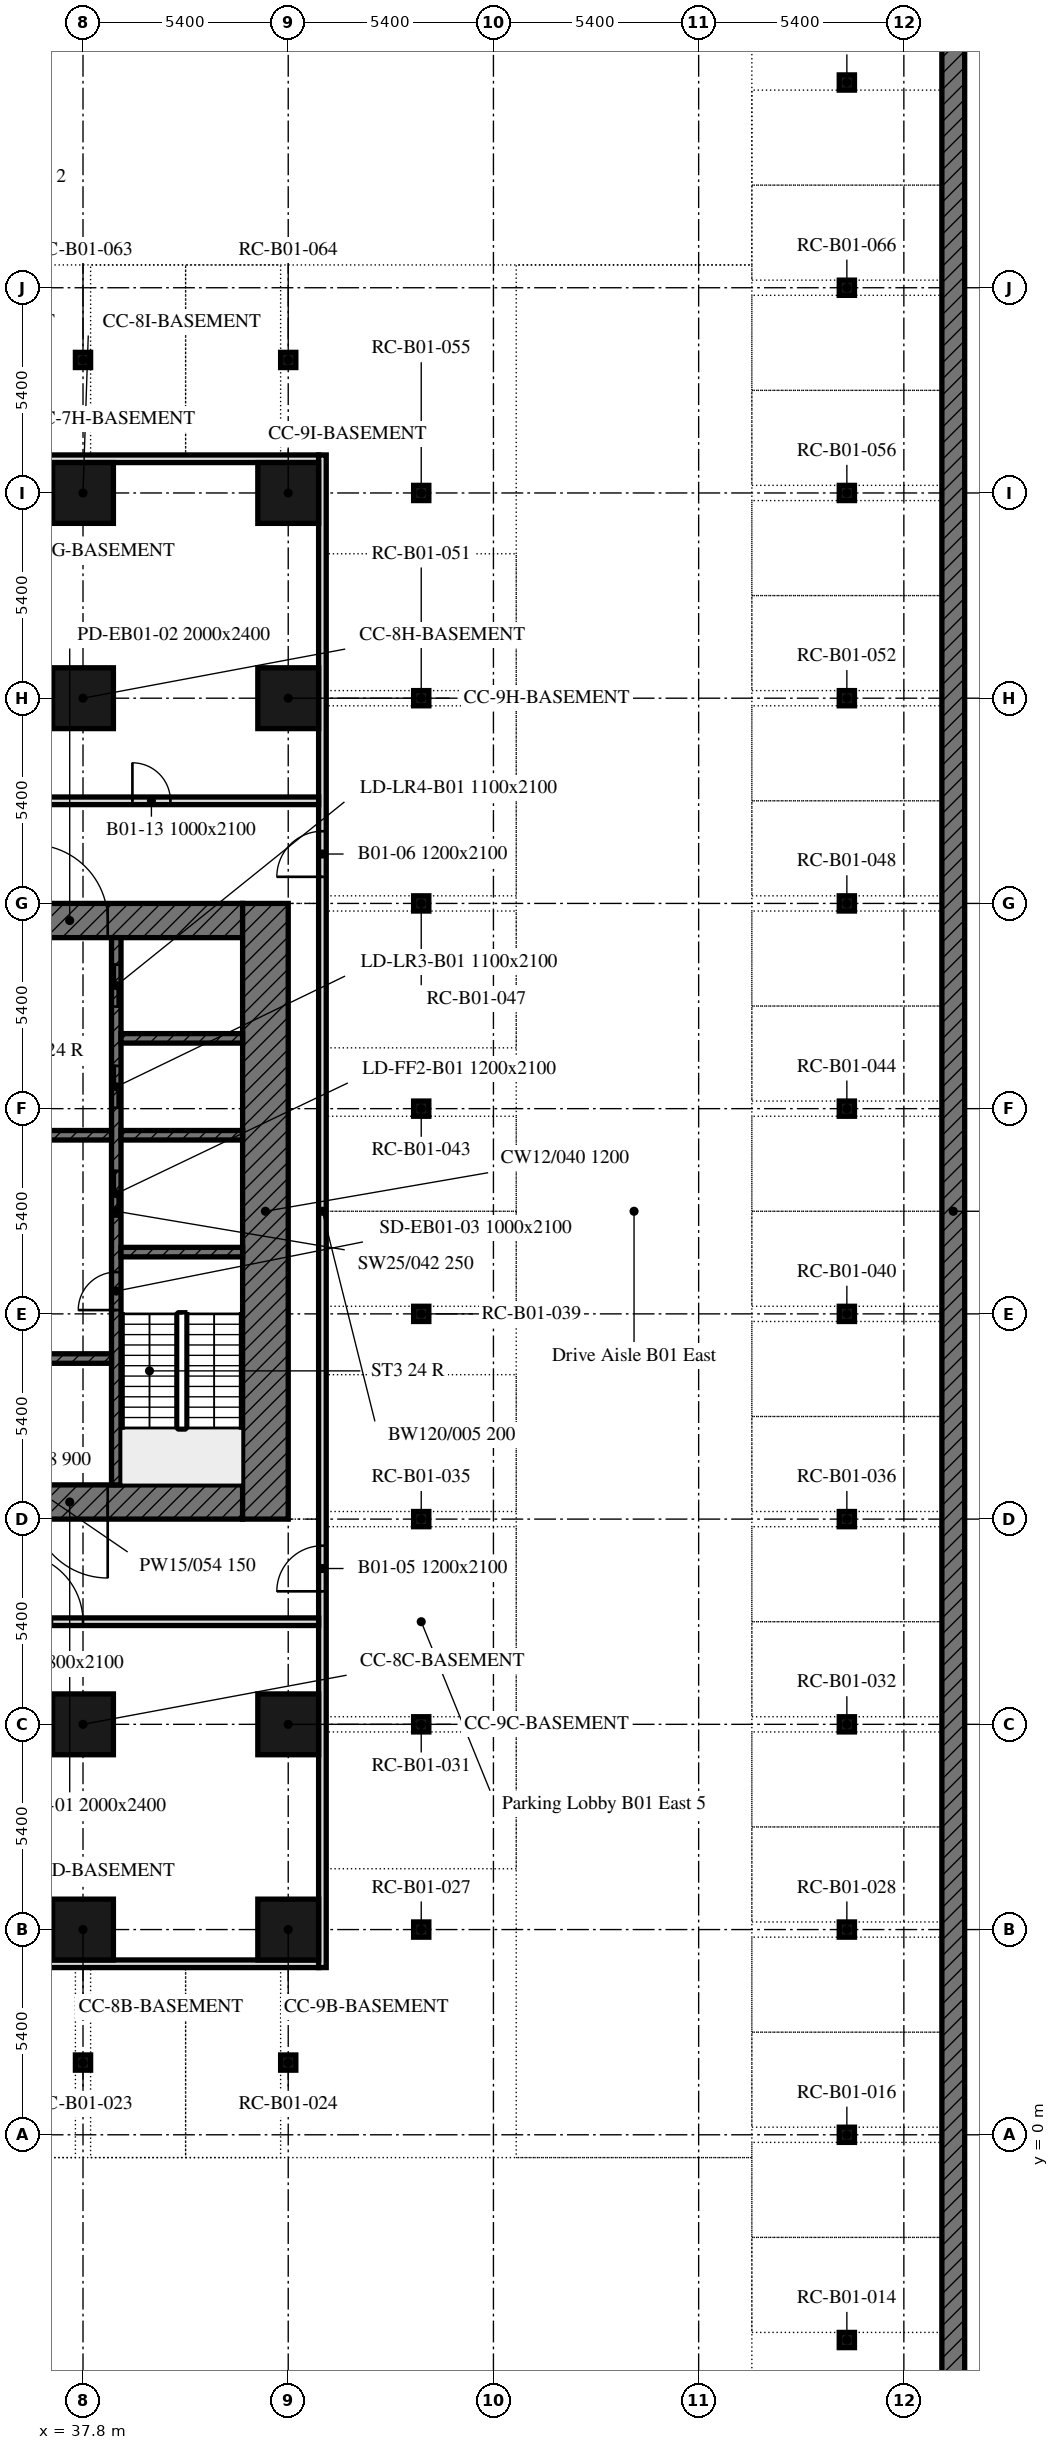
"""IFC4 building model, lengths in metres.
Left out: names, types, materials, properties, quantities, classifications, styles, units other than length and angle.
Written with IfcOpenShell. Run it as: python <this file> out.ifc"""

import sys

from ifc_helpers import new_model, si_unit, direction, frame, frame_2d, origin, origin_2d, place, context, subcontext, project, spatial, rectangle, extrude, element, fill, save


model = new_model("IFC4")
c1 = context("Model", 3, precision=1e-05, world=origin(), true_north=direction((0.0, 1.0)))
c2 = subcontext(c1, "Body", "Model", "MODEL_VIEW")
j1 = project(units=[si_unit("LENGTHUNIT", "METRE"), si_unit("PLANEANGLEUNIT", "RADIAN")], contexts=[c1])
p1 = place(None, origin())
s1 = spatial("IfcSite", under=j1, at=p1, CompositionType="ELEMENT")
p2 = place(p1, origin())
s2 = spatial("IfcBuilding", under=s1, at=p2, CompositionType="ELEMENT")
p3 = place(p2, frame((0.0, 0.0, -4.5)))
s3 = spatial("IfcBuildingStorey", under=s2, at=p3, CompositionType="ELEMENT", Elevation=-4.5)
p4 = place(p3, frame((60.7, -12.4, 0.0), z_axis=(0.0, 0.0, 1.0), x_axis=(0.0, 1.0, 0.0)))
e1 = element("IfcWall", 1, at=p4, inside=s3, PredefinedType="SOLIDWALL", context=c2, shape_type="SweptSolid", body=[
    extrude(rectangle(XDim=73.4, YDim=0.6, at=frame_2d((36.7, 0.0))), origin(), (0.0, 0.0, 1.0), 4.0),
])
for number, where, z_axis, x_axis in (
    (2, (37.8, 5.4, 0.0), (0.0, 0.0, 1.0), (1.0, 0.0, 0.0)),
    (3, (43.2, 5.4, 0.0), (0.0, 0.0, 1.0), (1.0, 0.0, 0.0)),
    (4, (37.8, 10.8, 0.0), (0.0, 0.0, 1.0), (1.0, 0.0, 0.0)),
    (5, (43.2, 10.8, 0.0), (0.0, 0.0, 1.0), (1.0, 0.0, 0.0)),
    (6, (37.8, 37.8, 0.0), (0.0, 0.0, 1.0), (1.0, 0.0, 0.0)),
    (7, (43.2, 37.8, 0.0), (0.0, 0.0, 1.0), (1.0, 0.0, 0.0)),
    (8, (37.8, 43.2, 0.0), (0.0, 0.0, 1.0), (1.0, 0.0, 0.0)),
    (9, (43.2, 43.2, 0.0), (0.0, 0.0, 1.0), (1.0, 0.0, 0.0)),
):
    element("IfcColumn", number, at=place(p3, frame(where, z_axis=z_axis, x_axis=x_axis)), inside=s3, PredefinedType="COLUMN", context=c2, shape_type="SweptSolid", body=[
        extrude(rectangle(XDim=1.6, YDim=1.6, at=origin_2d()), origin(), (0.0, 0.0, 1.0), 4.0),
    ])
for number, where, z_axis, x_axis in (
    (10, (57.9, -5.4, 0.0), (0.0, 0.0, 1.0), (1.0, 0.0, 0.0)),
    (11, (57.9, 0.0, 0.0), (0.0, 0.0, 1.0), (1.0, 0.0, 0.0)),
    (12, (37.8, 1.9, 0.0), (0.0, 0.0, 1.0), (1.0, 0.0, 0.0)),
    (13, (43.2, 1.9, 0.0), (0.0, 0.0, 1.0), (1.0, 0.0, 0.0)),
    (14, (46.7, 5.4, 0.0), (0.0, 0.0, 1.0), (1.0, 0.0, 0.0)),
    (15, (57.9, 5.4, 0.0), (0.0, 0.0, 1.0), (1.0, 0.0, 0.0)),
    (16, (46.7, 10.8, 0.0), (0.0, 0.0, 1.0), (1.0, 0.0, 0.0)),
    (17, (57.9, 10.8, 0.0), (0.0, 0.0, 1.0), (1.0, 0.0, 0.0)),
    (18, (46.7, 16.2, 0.0), (0.0, 0.0, 1.0), (1.0, 0.0, 0.0)),
    (19, (57.9, 16.2, 0.0), (0.0, 0.0, 1.0), (1.0, 0.0, 0.0)),
    (20, (46.7, 21.6, 0.0), (0.0, 0.0, 1.0), (1.0, 0.0, 0.0)),
    (21, (57.9, 21.6, 0.0), (0.0, 0.0, 1.0), (1.0, 0.0, 0.0)),
    (22, (46.7, 27.0, 0.0), (0.0, 0.0, 1.0), (1.0, 0.0, 0.0)),
    (23, (57.9, 27.0, 0.0), (0.0, 0.0, 1.0), (1.0, 0.0, 0.0)),
    (24, (46.7, 32.4, 0.0), (0.0, 0.0, 1.0), (1.0, 0.0, 0.0)),
    (25, (57.9, 32.4, 0.0), (0.0, 0.0, 1.0), (1.0, 0.0, 0.0)),
    (26, (46.7, 37.8, 0.0), (0.0, 0.0, 1.0), (1.0, 0.0, 0.0)),
    (27, (57.9, 37.8, 0.0), (0.0, 0.0, 1.0), (1.0, 0.0, 0.0)),
    (28, (46.7, 43.2, 0.0), (0.0, 0.0, 1.0), (1.0, 0.0, 0.0)),
    (29, (57.9, 43.2, 0.0), (0.0, 0.0, 1.0), (1.0, 0.0, 0.0)),
    (30, (37.8, 46.7, 0.0), (0.0, 0.0, 1.0), (1.0, 0.0, 0.0)),
    (31, (43.2, 46.7, 0.0), (0.0, 0.0, 1.0), (1.0, 0.0, 0.0)),
    (32, (57.9, 48.6, 0.0), (0.0, 0.0, 1.0), (1.0, 0.0, 0.0)),
    (33, (57.9, 54.0, 0.0), (0.0, 0.0, 1.0), (1.0, 0.0, 0.0)),
):
    element("IfcColumn", number, at=place(p3, frame(where, z_axis=z_axis, x_axis=x_axis)), inside=s3, PredefinedType="COLUMN", context=c2, shape_type="SweptSolid", body=[
        extrude(rectangle(XDim=0.4, YDim=0.4, at=origin_2d()), origin(), (0.0, 0.0, 1.0), 4.0),
    ])
p5 = place(p3, frame((4.6, 4.5, 0.0), z_axis=(0.0, 0.0, 1.0), x_axis=(1.0, 0.0, 0.0)))
e34 = element("IfcWall", 34, at=p5, inside=s3, PredefinedType="PARTITIONING", context=c2, shape_type="SweptSolid", body=[
    extrude(rectangle(XDim=39.4, YDim=0.2, at=frame_2d((19.7, 0.0))), origin(), (0.0, 0.0, 1.0), 4.0),
])
p6 = place(p5, frame((18.3, 0.0, 0.0)))
e35 = element("IfcOpeningElement", 35, at=p6, cuts=e34, PredefinedType="OPENING", context=c2, shape_type="SweptSolid", body=[
    extrude(rectangle(XDim=1.2, YDim=2.1, at=frame_2d((0.6, 1.05))), frame((0.0, 0.11, 0.0), z_axis=(0.0, -1.0, 0.0), x_axis=(1.0, 0.0, 0.0)), (0.0, 0.0, 1.0), 0.22),
])
p7 = place(p3, frame((4.6, 44.1, 0.0), z_axis=(0.0, 0.0, 1.0), x_axis=(1.0, 0.0, 0.0)))
e36 = element("IfcWall", 36, at=p7, inside=s3, PredefinedType="PARTITIONING", context=c2, shape_type="SweptSolid", body=[
    extrude(rectangle(XDim=39.4, YDim=0.2, at=frame_2d((19.7, 0.0))), origin(), (0.0, 0.0, 1.0), 4.0),
])
p8 = place(p7, frame((23.4, 0.0, 0.0)))
e37 = element("IfcOpeningElement", 37, at=p8, cuts=e36, PredefinedType="OPENING", context=c2, shape_type="SweptSolid", body=[
    extrude(rectangle(XDim=1.2, YDim=2.1, at=frame_2d((0.6, 1.05))), frame((0.0, 0.11, 0.0), z_axis=(0.0, -1.0, 0.0), x_axis=(1.0, 0.0, 0.0)), (0.0, 0.0, 1.0), 0.22),
])
p9 = place(p3, frame((44.1, 4.4, 0.0), z_axis=(0.0, 0.0, 1.0), x_axis=(0.0, 1.0, 0.0)))
e38 = element("IfcWall", 38, at=p9, inside=s3, PredefinedType="PARTITIONING", context=c2, shape_type="SweptSolid", body=[
    extrude(rectangle(XDim=39.8, YDim=0.2, at=frame_2d((19.9, 0.0))), origin(), (0.0, 0.0, 1.0), 4.0),
])
p10 = place(p9, frame((9.9, 0.0, 0.0)))
e39 = element("IfcOpeningElement", 39, at=p10, cuts=e38, PredefinedType="OPENING", context=c2, shape_type="SweptSolid", body=[
    extrude(rectangle(XDim=1.2, YDim=2.1, at=frame_2d((0.6, 1.05))), frame((0.0, 0.11, 0.0), z_axis=(0.0, -1.0, 0.0), x_axis=(1.0, 0.0, 0.0)), (0.0, 0.0, 1.0), 0.22),
])
p11 = place(p9, frame((28.7, 0.0, 0.0)))
e40 = element("IfcOpeningElement", 40, at=p11, cuts=e38, PredefinedType="OPENING", context=c2, shape_type="SweptSolid", body=[
    extrude(rectangle(XDim=1.2, YDim=2.1, at=frame_2d((0.6, 1.05))), frame((0.0, 0.11, 0.0), z_axis=(0.0, -1.0, 0.0), x_axis=(1.0, 0.0, 0.0)), (0.0, 0.0, 1.0), 0.22),
])
p12 = place(p3, frame((29.8, 13.5, 0.0), z_axis=(0.0, 0.0, 1.0), x_axis=(1.0, 0.0, 0.0)))
e41 = element("IfcWall", 41, at=p12, inside=s3, PredefinedType="PARTITIONING", context=c2, shape_type="SweptSolid", body=[
    extrude(rectangle(XDim=14.2, YDim=0.2, at=frame_2d((7.1, 0.0))), origin(), (0.0, 0.0, 1.0), 4.0),
])
p13 = place(p12, frame((6.2, 0.0, 0.0)))
e42 = element("IfcOpeningElement", 42, at=p13, cuts=e41, PredefinedType="OPENING", context=c2, shape_type="SweptSolid", body=[
    extrude(rectangle(XDim=1.8, YDim=2.1, at=frame_2d((0.9, 1.05))), frame((0.0, 0.11, 0.0), z_axis=(0.0, -1.0, 0.0), x_axis=(1.0, 0.0, 0.0)), (0.0, 0.0, 1.0), 0.22),
])
p14 = place(p3, frame((35.2, 35.1, 0.0), z_axis=(0.0, 0.0, 1.0), x_axis=(1.0, 0.0, 0.0)))
e43 = element("IfcWall", 43, at=p14, inside=s3, PredefinedType="PARTITIONING", context=c2, shape_type="SweptSolid", body=[
    extrude(rectangle(XDim=8.8, YDim=0.2, at=frame_2d((4.4, 0.0))), origin(), (0.0, 0.0, 1.0), 4.0),
])
p15 = place(p14, frame((3.9, 0.0, 0.0)))
e44 = element("IfcOpeningElement", 44, at=p15, cuts=e43, PredefinedType="OPENING", context=c2, shape_type="SweptSolid", body=[
    extrude(rectangle(XDim=1.0, YDim=2.1, at=frame_2d((0.5, 1.05))), frame((0.0, 0.11, 0.0), z_axis=(0.0, -1.0, 0.0), x_axis=(1.0, 0.0, 0.0)), (0.0, 0.0, 1.0), 0.22),
])
p16 = place(p3, frame((42.0, 16.65, 0.0), z_axis=(0.0, 0.0, 1.0), x_axis=(-1.0, 0.0, 0.0)))
e45 = element("IfcWall", 45, at=p16, inside=s3, PredefinedType="SOLIDWALL", context=c2, shape_type="SweptSolid", body=[
    extrude(rectangle(XDim=11.1, YDim=0.9, at=frame_2d((5.55, 0.0))), origin(), (0.0, 0.0, 1.0), 4.0),
])
p17 = place(p16, frame((3.55, 0.0, 0.0)))
e46 = element("IfcOpeningElement", 46, at=p17, cuts=e45, PredefinedType="OPENING", context=c2, shape_type="SweptSolid", body=[
    extrude(rectangle(XDim=2.0, YDim=2.4, at=frame_2d((1.0, 1.2))), frame((0.0, 0.45, 0.0), z_axis=(0.0, -1.0, 0.0), x_axis=(1.0, 0.0, 0.0)), (0.0, 0.0, 1.0), 0.9),
])
p18 = place(p3, frame((30.9, 31.95, 0.0), z_axis=(0.0, 0.0, 1.0), x_axis=(1.0, 0.0, 0.0)))
e47 = element("IfcWall", 47, at=p18, inside=s3, PredefinedType="SOLIDWALL", context=c2, shape_type="SweptSolid", body=[
    extrude(rectangle(XDim=11.1, YDim=0.9, at=frame_2d((5.55, 0.0))), origin(), (0.0, 0.0, 1.0), 4.0),
])
p19 = place(p18, frame((5.55, 0.0, 0.0)))
e48 = element("IfcOpeningElement", 48, at=p19, cuts=e47, PredefinedType="OPENING", context=c2, shape_type="SweptSolid", body=[
    extrude(rectangle(XDim=2.0, YDim=2.4, at=frame_2d((1.0, 1.2))), frame((0.0, 0.45, 0.0), z_axis=(0.0, -1.0, 0.0), x_axis=(1.0, 0.0, 0.0)), (0.0, 0.0, 1.0), 0.9),
])
p20 = place(p3, frame((42.6, 32.4, 0.0), z_axis=(0.0, 0.0, 1.0), x_axis=(0.0, -1.0, 0.0)))
e49 = element("IfcWall", 49, at=p20, inside=s3, PredefinedType="SOLIDWALL", context=c2, shape_type="SweptSolid", body=[
    extrude(rectangle(XDim=16.2, YDim=1.2, at=frame_2d((8.1, 0.0))), origin(), (0.0, 0.0, 1.0), 4.0),
])
p21 = place(p3, frame((38.675, 17.1, 0.0), z_axis=(0.0, 0.0, 1.0), x_axis=(0.0, 1.0, 0.0)))
e50 = element("IfcWall", 50, at=p21, inside=s3, PredefinedType="SOLIDWALL", context=c2, shape_type="SweptSolid", body=[
    extrude(rectangle(XDim=14.4, YDim=0.25, at=frame_2d((7.2, 0.0))), origin(), (0.0, 0.0, 1.0), 4.0),
])
p22 = place(p21, frame((4.6, 0.0, 0.0)))
e51 = element("IfcOpeningElement", 51, at=p22, cuts=e50, PredefinedType="OPENING", context=c2, shape_type="SweptSolid", body=[
    extrude(rectangle(XDim=1.0, YDim=2.1, at=frame_2d((0.5, 1.05))), frame((0.0, 0.125, 0.0), z_axis=(0.0, -1.0, 0.0), x_axis=(1.0, 0.0, 0.0)), (0.0, 0.0, 1.0), 0.25),
])
p23 = place(p21, frame((7.062, 0.0, 0.0)))
e52 = element("IfcOpeningElement", 52, at=p23, cuts=e50, PredefinedType="OPENING", context=c2, shape_type="SweptSolid", body=[
    extrude(rectangle(XDim=1.2, YDim=2.1, at=frame_2d((0.6, 1.05))), frame((0.0, 0.125, 0.0), z_axis=(0.0, -1.0, 0.0), x_axis=(1.0, 0.0, 0.0)), (0.0, 0.0, 1.0), 0.25),
])
p24 = place(p21, frame((9.925, 0.0, 0.0)))
e53 = element("IfcOpeningElement", 53, at=p24, cuts=e50, PredefinedType="OPENING", context=c2, shape_type="SweptSolid", body=[
    extrude(rectangle(XDim=1.1, YDim=2.1, at=frame_2d((0.55, 1.05))), frame((0.0, 0.125, 0.0), z_axis=(0.0, -1.0, 0.0), x_axis=(1.0, 0.0, 0.0)), (0.0, 0.0, 1.0), 0.25),
])
p25 = place(p21, frame((12.587, 0.0, 0.0)))
e54 = element("IfcOpeningElement", 54, at=p25, cuts=e50, PredefinedType="OPENING", context=c2, shape_type="SweptSolid", body=[
    extrude(rectangle(XDim=1.1, YDim=2.1, at=frame_2d((0.55, 1.05))), frame((0.0, 0.125, 0.0), z_axis=(0.0, -1.0, 0.0), x_axis=(1.0, 0.0, 0.0)), (0.0, 0.0, 1.0), 0.25),
])
for number, where, z_axis, x_axis in (
    (55, (38.8, 23.225, 0.0), (0.0, 0.0, 1.0), (1.0, 0.0, 0.0)),
    (56, (38.8, 26.3, 0.0), (0.0, 0.0, 1.0), (1.0, 0.0, 0.0)),
):
    element("IfcWall", number, at=place(p3, frame(where, z_axis=z_axis, x_axis=x_axis)), inside=s3, PredefinedType="SOLIDWALL", context=c2, shape_type="SweptSolid", body=[
        extrude(rectangle(XDim=3.2, YDim=0.25, at=frame_2d((1.6, 0.0))), origin(), (0.0, 0.0, 1.0), 4.0),
    ])
for number, where, z_axis, x_axis in (
    (57, (35.8, 26.3, 0.0), (0.0, 0.0, 1.0), (1.0, 0.0, 0.0)),
    (58, (35.8, 20.425, 0.0), (0.0, 0.0, 1.0), (1.0, 0.0, 0.0)),
):
    element("IfcWall", number, at=place(p3, frame(where, z_axis=z_axis, x_axis=x_axis)), inside=s3, PredefinedType="SOLIDWALL", context=c2, shape_type="SweptSolid", body=[
        extrude(rectangle(XDim=2.75, YDim=0.25, at=frame_2d((1.375, 0.0))), origin(), (0.0, 0.0, 1.0), 4.0),
    ])
p26 = place(p3, frame((38.8, 28.85, 0.0), z_axis=(0.0, 0.0, 1.0), x_axis=(1.0, 0.0, 0.0)))
e59 = element("IfcWall", 59, at=p26, inside=s3, PredefinedType="SOLIDWALL", context=c2, shape_type="SweptSolid", body=[
    extrude(rectangle(XDim=3.2, YDim=0.25, at=frame_2d((1.6, 0.0))), origin(), (0.0, 0.0, 1.0), 4.0),
])
p27 = place(p10, origin())
e60 = element("IfcDoor", 60, at=p27, inside=s3, OperationType="SINGLE_SWING_LEFT", PredefinedType="DOOR", context=c2, shape_type="SweptSolid", body=[
    extrude(rectangle(XDim=1.2, YDim=2.1, at=frame_2d((0.6, 1.05))), frame((0.0, 0.025, 0.0), z_axis=(0.0, -1.0, 0.0), x_axis=(1.0, 0.0, 0.0)), (0.0, 0.0, 1.0), 0.05),
])
fill(e39, e60)
p28 = place(p11, origin())
e61 = element("IfcDoor", 61, at=p28, inside=s3, OperationType="SINGLE_SWING_LEFT", PredefinedType="DOOR", context=c2, shape_type="SweptSolid", body=[
    extrude(rectangle(XDim=1.2, YDim=2.1, at=frame_2d((0.6, 1.05))), frame((0.0, 0.025, 0.0), z_axis=(0.0, -1.0, 0.0), x_axis=(1.0, 0.0, 0.0)), (0.0, 0.0, 1.0), 0.05),
])
fill(e40, e61)
p29 = place(p13, origin())
e62 = element("IfcDoor", 62, at=p29, inside=s3, OperationType="DOUBLE_DOOR_SINGLE_SWING", PredefinedType="DOOR", context=c2, shape_type="SweptSolid", body=[
    extrude(rectangle(XDim=1.8, YDim=2.1, at=frame_2d((0.9, 1.05))), frame((0.0, 0.025, 0.0), z_axis=(0.0, -1.0, 0.0), x_axis=(1.0, 0.0, 0.0)), (0.0, 0.0, 1.0), 0.05),
])
fill(e42, e62)
p30 = place(p15, origin())
e63 = element("IfcDoor", 63, at=p30, inside=s3, OperationType="SINGLE_SWING_LEFT", PredefinedType="DOOR", context=c2, shape_type="SweptSolid", body=[
    extrude(rectangle(XDim=1.0, YDim=2.1, at=frame_2d((0.5, 1.05))), frame((0.0, 0.025, 0.0), z_axis=(0.0, -1.0, 0.0), x_axis=(1.0, 0.0, 0.0)), (0.0, 0.0, 1.0), 0.05),
])
fill(e44, e63)
p31 = place(p17, origin())
e64 = element("IfcDoor", 64, at=p31, inside=s3, OperationType="DOUBLE_DOOR_SINGLE_SWING", PredefinedType="DOOR", context=c2, shape_type="SweptSolid", body=[
    extrude(rectangle(XDim=2.0, YDim=2.4, at=frame_2d((1.0, 1.2))), frame((0.0, 0.025, 0.0), z_axis=(0.0, -1.0, 0.0), x_axis=(1.0, 0.0, 0.0)), (0.0, 0.0, 1.0), 0.05),
])
fill(e46, e64)
p32 = place(p19, origin())
e65 = element("IfcDoor", 65, at=p32, inside=s3, OperationType="DOUBLE_DOOR_SINGLE_SWING", PredefinedType="DOOR", context=c2, shape_type="SweptSolid", body=[
    extrude(rectangle(XDim=2.0, YDim=2.4, at=frame_2d((1.0, 1.2))), frame((0.0, 0.025, 0.0), z_axis=(0.0, -1.0, 0.0), x_axis=(1.0, 0.0, 0.0)), (0.0, 0.0, 1.0), 0.05),
])
fill(e48, e65)
p33 = place(p22, origin())
e66 = element("IfcDoor", 66, at=p33, inside=s3, OperationType="SINGLE_SWING_LEFT", PredefinedType="DOOR", context=c2, shape_type="SweptSolid", body=[
    extrude(rectangle(XDim=1.0, YDim=2.1, at=frame_2d((0.5, 1.05))), frame((0.0, 0.025, 0.0), z_axis=(0.0, -1.0, 0.0), x_axis=(1.0, 0.0, 0.0)), (0.0, 0.0, 1.0), 0.05),
])
fill(e51, e66)
p34 = place(p23, origin())
e67 = element("IfcDoor", 67, at=p34, inside=s3, OperationType="DOUBLE_DOOR_SLIDING", PredefinedType="DOOR", context=c2, shape_type="SweptSolid", body=[
    extrude(rectangle(XDim=1.2, YDim=2.1, at=frame_2d((0.6, 1.05))), frame((0.0, 0.025, 0.0), z_axis=(0.0, -1.0, 0.0), x_axis=(1.0, 0.0, 0.0)), (0.0, 0.0, 1.0), 0.05),
])
fill(e52, e67)
p35 = place(p24, origin())
e68 = element("IfcDoor", 68, at=p35, inside=s3, OperationType="DOUBLE_DOOR_SLIDING", PredefinedType="DOOR", context=c2, shape_type="SweptSolid", body=[
    extrude(rectangle(XDim=1.1, YDim=2.1, at=frame_2d((0.55, 1.05))), frame((0.0, 0.025, 0.0), z_axis=(0.0, -1.0, 0.0), x_axis=(1.0, 0.0, 0.0)), (0.0, 0.0, 1.0), 0.05),
])
fill(e53, e68)
p36 = place(p25, origin())
e69 = element("IfcDoor", 69, at=p36, inside=s3, OperationType="DOUBLE_DOOR_SLIDING", PredefinedType="DOOR", context=c2, shape_type="SweptSolid", body=[
    extrude(rectangle(XDim=1.1, YDim=2.1, at=frame_2d((0.55, 1.05))), frame((0.0, 0.025, 0.0), z_axis=(0.0, -1.0, 0.0), x_axis=(1.0, 0.0, 0.0)), (0.0, 0.0, 1.0), 0.05),
])
fill(e54, e69)
save(model, sys.argv[1])
